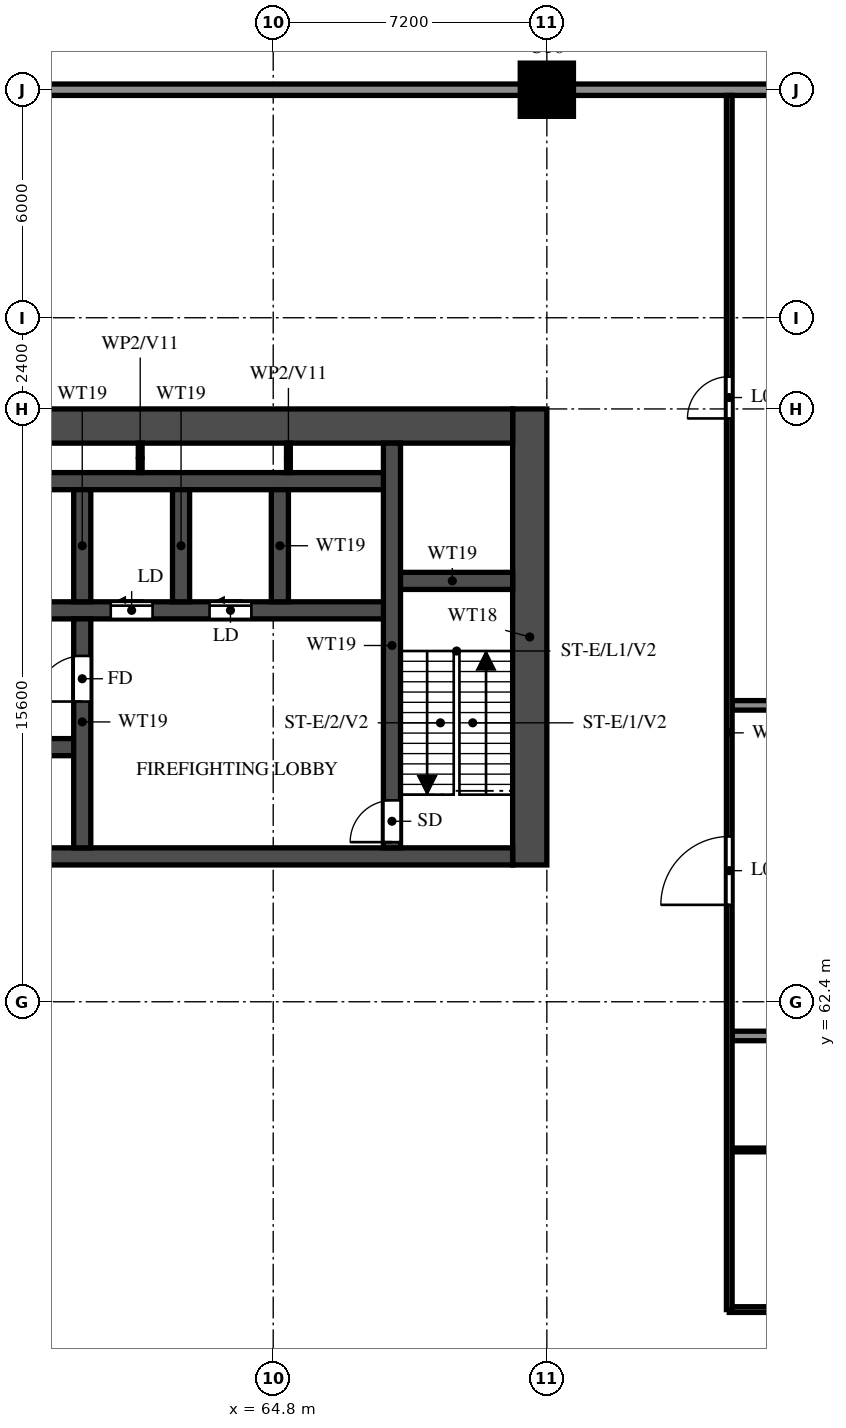
"""IFC4 building model, lengths in metres.
Left out: names, types, materials, properties, quantities, classifications, styles, units other than length and angle.
Written with IfcOpenShell. Run it as: python <this file> out.ifc"""

import sys

from ifc_helpers import new_model, si_unit, direction, frame, frame_2d, origin, origin_2d, place, context, subcontext, project, spatial, rectangle, circle, extrude, source, transform, mapped, element, fill, save


model = new_model("IFC4")
c1 = context("Model", 3, precision=1e-05, world=origin(), true_north=direction((0.0, 1.0)))
c2 = subcontext(c1, "Body", "Model", "MODEL_VIEW")
j1 = project(units=[si_unit("LENGTHUNIT", "METRE"), si_unit("PLANEANGLEUNIT", "RADIAN")], contexts=[c1])
p1 = place(None, origin())
s1 = spatial("IfcSite", under=j1, at=p1, CompositionType="ELEMENT")
p2 = place(p1, origin())
s2 = spatial("IfcBuilding", under=s1, at=p2, CompositionType="ELEMENT")
p3 = place(p2, frame((0.0, 0.0, 21.6)))
s3 = spatial("IfcBuildingStorey", under=s2, at=p3, CompositionType="ELEMENT", Elevation=21.6)
m1 = source(origin(), c2, "Body", "SweptSolid", [
    extrude(circle(Radius=0.7, at=origin_2d()), origin(), (0.0, 0.0, 1.0), 4.95),
])
p4 = place(p3, frame((72.0, 86.4, 0.0), z_axis=(0.0, 0.0, 1.0), x_axis=(1.0, 0.0, 0.0)))
e1 = element("IfcColumn", 1, at=p4, inside=s3, PredefinedType="COLUMN", context=c2, shape_type="MappedRepresentation", body=[
    mapped(m1, transform((0.0, 0.0, 0.0))),
])
p5 = place(p3, frame((71.55, 66.0, 0.0), z_axis=(0.0, 0.0, 1.0), x_axis=(0.0, 1.0, 0.0)))
e2 = element("IfcWall", 2, at=p5, inside=s3, PredefinedType="SHEAR", context=c2, shape_type="SweptSolid", body=[
    extrude(rectangle(XDim=12.0, YDim=0.9, at=frame_2d((6.0, 0.0))), origin(), (0.0, 0.0, 1.0), 4.95),
])
p6 = place(p3, frame((29.7, 77.55, 0.0), z_axis=(0.0, 0.0, 1.0), x_axis=(1.0, 0.0, 0.0)))
e3 = element("IfcWall", 3, at=p6, inside=s3, PredefinedType="SHEAR", context=c2, shape_type="SweptSolid", body=[
    extrude(rectangle(XDim=41.4, YDim=0.9, at=frame_2d((20.7, 0.0))), origin(), (0.0, 0.0, 1.0), 4.95),
])
p7 = place(p3, frame((29.7, 66.225, 0.0), z_axis=(0.0, 0.0, 1.0), x_axis=(1.0, 0.0, 0.0)))
e4 = element("IfcWall", 4, at=p7, inside=s3, PredefinedType="SHEAR", context=c2, shape_type="SweptSolid", body=[
    extrude(rectangle(XDim=41.4, YDim=0.45, at=frame_2d((20.7, 0.0))), origin(), (0.0, 0.0, 1.0), 4.95),
])
p8 = place(p7, frame((0.925, 0.0, 0.0)))
e5 = element("IfcOpeningElement", 5, at=p8, cuts=e4, PredefinedType="OPENING", context=c2, shape_type="SweptSolid", body=[
    extrude(rectangle(XDim=1.1, YDim=2.1, at=frame_2d((0.55, 1.05))), frame((0.0, 0.235, 0.0), z_axis=(0.0, -1.0, 0.0), x_axis=(1.0, 0.0, 0.0)), (0.0, 0.0, 1.0), 0.47),
])
p9 = place(p7, frame((3.738, 0.0, 0.0)))
e6 = element("IfcOpeningElement", 6, at=p9, cuts=e4, PredefinedType="OPENING", context=c2, shape_type="SweptSolid", body=[
    extrude(rectangle(XDim=1.8, YDim=2.1, at=frame_2d((0.9, 1.05))), frame((0.0, 0.235, 0.0), z_axis=(0.0, -1.0, 0.0), x_axis=(1.0, 0.0, 0.0)), (0.0, 0.0, 1.0), 0.47),
])
p10 = place(p3, frame((35.575, 69.1, 0.0), z_axis=(0.0, 0.0, 1.0), x_axis=(1.0, 0.0, 0.0)))
e7 = element("IfcWall", 7, at=p10, inside=s3, PredefinedType="SHEAR", context=c2, shape_type="SweptSolid", body=[
    extrude(rectangle(XDim=24.2, YDim=0.45, at=frame_2d((12.1, 0.0))), origin(), (0.0, 0.0, 1.0), 4.95),
])
p11 = place(p10, frame((1.05, 0.0, 0.0)))
e8 = element("IfcOpeningElement", 8, at=p11, cuts=e7, PredefinedType="OPENING", context=c2, shape_type="SweptSolid", body=[
    extrude(rectangle(XDim=1.1, YDim=2.1, at=frame_2d((0.55, 1.05))), frame((0.0, 0.235, 0.0), z_axis=(0.0, -1.0, 0.0), x_axis=(1.0, 0.0, 0.0)), (0.0, 0.0, 1.0), 0.47),
])
p12 = place(p10, frame((3.8, 0.0, 0.0)))
e9 = element("IfcOpeningElement", 9, at=p12, cuts=e7, PredefinedType="OPENING", context=c2, shape_type="SweptSolid", body=[
    extrude(rectangle(XDim=1.1, YDim=2.1, at=frame_2d((0.55, 1.05))), frame((0.0, 0.235, 0.0), z_axis=(0.0, -1.0, 0.0), x_axis=(1.0, 0.0, 0.0)), (0.0, 0.0, 1.0), 0.47),
])
p13 = place(p10, frame((6.55, 0.0, 0.0)))
e10 = element("IfcOpeningElement", 10, at=p13, cuts=e7, PredefinedType="OPENING", context=c2, shape_type="SweptSolid", body=[
    extrude(rectangle(XDim=1.1, YDim=2.1, at=frame_2d((0.55, 1.05))), frame((0.0, 0.235, 0.0), z_axis=(0.0, -1.0, 0.0), x_axis=(1.0, 0.0, 0.0)), (0.0, 0.0, 1.0), 0.47),
])
p14 = place(p10, frame((9.3, 0.0, 0.0)))
e11 = element("IfcOpeningElement", 11, at=p14, cuts=e7, PredefinedType="OPENING", context=c2, shape_type="SweptSolid", body=[
    extrude(rectangle(XDim=1.1, YDim=2.1, at=frame_2d((0.55, 1.05))), frame((0.0, 0.235, 0.0), z_axis=(0.0, -1.0, 0.0), x_axis=(1.0, 0.0, 0.0)), (0.0, 0.0, 1.0), 0.47),
])
p15 = place(p10, frame((12.05, 0.0, 0.0)))
e12 = element("IfcOpeningElement", 12, at=p15, cuts=e7, PredefinedType="OPENING", context=c2, shape_type="SweptSolid", body=[
    extrude(rectangle(XDim=1.1, YDim=2.1, at=frame_2d((0.55, 1.05))), frame((0.0, 0.235, 0.0), z_axis=(0.0, -1.0, 0.0), x_axis=(1.0, 0.0, 0.0)), (0.0, 0.0, 1.0), 0.47),
])
p16 = place(p10, frame((14.8, 0.0, 0.0)))
e13 = element("IfcOpeningElement", 13, at=p16, cuts=e7, PredefinedType="OPENING", context=c2, shape_type="SweptSolid", body=[
    extrude(rectangle(XDim=1.1, YDim=2.1, at=frame_2d((0.55, 1.05))), frame((0.0, 0.235, 0.0), z_axis=(0.0, -1.0, 0.0), x_axis=(1.0, 0.0, 0.0)), (0.0, 0.0, 1.0), 0.47),
])
p17 = place(p3, frame((32.875, 72.7, 0.0), z_axis=(0.0, 0.0, 1.0), x_axis=(1.0, 0.0, 0.0)))
e14 = element("IfcWall", 14, at=p17, inside=s3, PredefinedType="SHEAR", context=c2, shape_type="SweptSolid", body=[
    extrude(rectangle(XDim=35.05, YDim=0.45, at=frame_2d((17.525, 0.0))), origin(), (0.0, 0.0, 1.0), 4.95),
])
p18 = place(p17, frame((19.8, 0.0, 0.0)))
e15 = element("IfcOpeningElement", 15, at=p18, cuts=e14, PredefinedType="OPENING", context=c2, shape_type="SweptSolid", body=[
    extrude(rectangle(XDim=1.1, YDim=2.1, at=frame_2d((0.55, 1.05))), frame((0.0, 0.235, 0.0), z_axis=(0.0, -1.0, 0.0), x_axis=(1.0, 0.0, 0.0)), (0.0, 0.0, 1.0), 0.47),
])
p19 = place(p17, frame((27.65, 0.0, 0.0)))
e16 = element("IfcOpeningElement", 16, at=p19, cuts=e14, PredefinedType="OPENING", context=c2, shape_type="SweptSolid", body=[
    extrude(rectangle(XDim=1.1, YDim=2.1, at=frame_2d((0.55, 1.05))), frame((0.0, 0.235, 0.0), z_axis=(0.0, -1.0, 0.0), x_axis=(1.0, 0.0, 0.0)), (0.0, 0.0, 1.0), 0.47),
])
p20 = place(p17, frame((30.25, 0.0, 0.0)))
e17 = element("IfcOpeningElement", 17, at=p20, cuts=e14, PredefinedType="OPENING", context=c2, shape_type="SweptSolid", body=[
    extrude(rectangle(XDim=1.1, YDim=2.1, at=frame_2d((0.55, 1.05))), frame((0.0, 0.235, 0.0), z_axis=(0.0, -1.0, 0.0), x_axis=(1.0, 0.0, 0.0)), (0.0, 0.0, 1.0), 0.47),
])
p21 = place(p17, frame((3.75, 0.0, 0.0)))
e18 = element("IfcOpeningElement", 18, at=p21, cuts=e14, PredefinedType="OPENING", context=c2, shape_type="SweptSolid", body=[
    extrude(rectangle(XDim=1.1, YDim=2.1, at=frame_2d((0.55, 1.05))), frame((0.0, 0.235, 0.0), z_axis=(0.0, -1.0, 0.0), x_axis=(1.0, 0.0, 0.0)), (0.0, 0.0, 1.0), 0.47),
])
p22 = place(p17, frame((6.5, 0.0, 0.0)))
e19 = element("IfcOpeningElement", 19, at=p22, cuts=e14, PredefinedType="OPENING", context=c2, shape_type="SweptSolid", body=[
    extrude(rectangle(XDim=1.1, YDim=2.1, at=frame_2d((0.55, 1.05))), frame((0.0, 0.235, 0.0), z_axis=(0.0, -1.0, 0.0), x_axis=(1.0, 0.0, 0.0)), (0.0, 0.0, 1.0), 0.47),
])
p23 = place(p17, frame((9.25, 0.0, 0.0)))
e20 = element("IfcOpeningElement", 20, at=p23, cuts=e14, PredefinedType="OPENING", context=c2, shape_type="SweptSolid", body=[
    extrude(rectangle(XDim=1.1, YDim=2.1, at=frame_2d((0.55, 1.05))), frame((0.0, 0.235, 0.0), z_axis=(0.0, -1.0, 0.0), x_axis=(1.0, 0.0, 0.0)), (0.0, 0.0, 1.0), 0.47),
])
p24 = place(p17, frame((12.0, 0.0, 0.0)))
e21 = element("IfcOpeningElement", 21, at=p24, cuts=e14, PredefinedType="OPENING", context=c2, shape_type="SweptSolid", body=[
    extrude(rectangle(XDim=1.1, YDim=2.1, at=frame_2d((0.55, 1.05))), frame((0.0, 0.235, 0.0), z_axis=(0.0, -1.0, 0.0), x_axis=(1.0, 0.0, 0.0)), (0.0, 0.0, 1.0), 0.47),
])
p25 = place(p17, frame((14.75, 0.0, 0.0)))
e22 = element("IfcOpeningElement", 22, at=p25, cuts=e14, PredefinedType="OPENING", context=c2, shape_type="SweptSolid", body=[
    extrude(rectangle(XDim=1.1, YDim=2.1, at=frame_2d((0.55, 1.05))), frame((0.0, 0.235, 0.0), z_axis=(0.0, -1.0, 0.0), x_axis=(1.0, 0.0, 0.0)), (0.0, 0.0, 1.0), 0.47),
])
p26 = place(p17, frame((17.5, 0.0, 0.0)))
e23 = element("IfcOpeningElement", 23, at=p26, cuts=e14, PredefinedType="OPENING", context=c2, shape_type="SweptSolid", body=[
    extrude(rectangle(XDim=1.1, YDim=2.1, at=frame_2d((0.55, 1.05))), frame((0.0, 0.235, 0.0), z_axis=(0.0, -1.0, 0.0), x_axis=(1.0, 0.0, 0.0)), (0.0, 0.0, 1.0), 0.47),
])
p27 = place(p17, frame((0.913, 0.0, 0.0)))
e24 = element("IfcOpeningElement", 24, at=p27, cuts=e14, PredefinedType="OPENING", context=c2, shape_type="SweptSolid", body=[
    extrude(rectangle(XDim=1.1, YDim=2.1, at=frame_2d((0.55, 1.05))), frame((0.0, 0.235, 0.0), z_axis=(0.0, -1.0, 0.0), x_axis=(1.0, 0.0, 0.0)), (0.0, 0.0, 1.0), 0.47),
])
p28 = place(p3, frame((32.875, 76.1, 0.0), z_axis=(0.0, 0.0, 1.0), x_axis=(1.0, 0.0, 0.0)))
e25 = element("IfcWall", 25, at=p28, inside=s3, PredefinedType="SHEAR", context=c2, shape_type="SweptSolid", body=[
    extrude(rectangle(XDim=35.05, YDim=0.45, at=frame_2d((17.525, 0.0))), origin(), (0.0, 0.0, 1.0), 4.95),
])
p29 = place(p3, frame((67.925, 73.475, 0.0), z_axis=(0.0, 0.0, 1.0), x_axis=(1.0, 0.0, 0.0)))
e26 = element("IfcWall", 26, at=p29, inside=s3, PredefinedType="SHEAR", context=c2, shape_type="SweptSolid", body=[
    extrude(rectangle(XDim=3.175, YDim=0.45, at=frame_2d((1.587, 0.0))), origin(), (0.0, 0.0, 1.0), 4.95),
])
p30 = place(p3, frame((67.925, 66.45, 0.0), z_axis=(0.0, 0.0, 1.0), x_axis=(0.0, 1.0, 0.0)))
e27 = element("IfcWall", 27, at=p30, inside=s3, PredefinedType="SHEAR", context=c2, shape_type="SweptSolid", body=[
    extrude(rectangle(XDim=10.65, YDim=0.45, at=frame_2d((5.325, 0.0))), origin(), (0.0, 0.0, 1.0), 4.95),
])
p31 = place(p30, frame((0.15, 0.0, 0.0)))
e28 = element("IfcOpeningElement", 28, at=p31, cuts=e27, PredefinedType="OPENING", context=c2, shape_type="SweptSolid", body=[
    extrude(rectangle(XDim=1.1, YDim=2.1, at=frame_2d((0.55, 1.05))), frame((0.0, 0.235, 0.0), z_axis=(0.0, -1.0, 0.0), x_axis=(1.0, 0.0, 0.0)), (0.0, 0.0, 1.0), 0.47),
])
p32 = place(p3, frame((59.775, 66.45, 0.0), z_axis=(0.0, 0.0, 1.0), x_axis=(0.0, 1.0, 0.0)))
e29 = element("IfcWall", 29, at=p32, inside=s3, PredefinedType="SHEAR", context=c2, shape_type="SweptSolid", body=[
    extrude(rectangle(XDim=6.025, YDim=0.45, at=frame_2d((3.013, 0.0))), origin(), (0.0, 0.0, 1.0), 4.95),
])
p33 = place(p32, frame((3.85, 0.0, 0.0)))
e30 = element("IfcOpeningElement", 30, at=p33, cuts=e29, PredefinedType="OPENING", context=c2, shape_type="SweptSolid", body=[
    extrude(rectangle(XDim=1.2, YDim=2.1, at=frame_2d((0.6, 1.05))), frame((0.0, 0.235, 0.0), z_axis=(0.0, -1.0, 0.0), x_axis=(1.0, 0.0, 0.0)), (0.0, 0.0, 1.0), 0.47),
])
for number, where, z_axis, x_axis in (
    (31, (59.775, 72.925, 0.0), (0.0, 0.0, 1.0), (0.0, 1.0, 0.0)),
    (32, (62.375, 72.925, 0.0), (0.0, 0.0, 1.0), (0.0, 1.0, 0.0)),
    (33, (64.975, 72.925, 0.0), (0.0, 0.0, 1.0), (0.0, 1.0, 0.0)),
):
    element("IfcWall", number, at=place(p3, frame(where, z_axis=z_axis, x_axis=x_axis)), inside=s3, PredefinedType="SHEAR", context=c2, shape_type="SweptSolid", body=[
        extrude(rectangle(XDim=2.95, YDim=0.45, at=frame_2d((1.475, 0.0))), origin(), (0.0, 0.0, 1.0), 4.95),
    ])
for number, where, z_axis, x_axis in (
    (34, (61.3, 76.325, 0.0), (0.0, 0.0, 1.0), (0.0, 1.0, 0.0)),
    (35, (65.2, 76.325, 0.0), (0.0, 0.0, 1.0), (0.0, 1.0, 0.0)),
):
    element("IfcWall", number, at=place(p3, frame(where, z_axis=z_axis, x_axis=x_axis)), inside=s3, PredefinedType="PARTITIONING", context=c2, shape_type="SweptSolid", body=[
        extrude(rectangle(XDim=0.775, YDim=0.1, at=frame_2d((0.388, 0.0))), origin(), (0.0, 0.0, 1.0), 4.95),
    ])
p34 = place(p3, frame((76.8, 54.3, 0.0), z_axis=(0.0, 0.0, 1.0), x_axis=(1.0, 0.0, 0.0)))
e36 = element("IfcWall", 36, at=p34, inside=s3, PredefinedType="PARTITIONING", context=c2, shape_type="SweptSolid", body=[
    extrude(rectangle(XDim=19.75, YDim=0.15, at=frame_2d((9.875, 0.0))), origin(), (0.0, 0.0, 1.0), 3.45),
])
p35 = place(p34, frame((6.65, 0.0, 0.0)))
e37 = element("IfcOpeningElement", 37, at=p35, cuts=e36, PredefinedType="OPENING", context=c2, shape_type="SweptSolid", body=[
    extrude(rectangle(XDim=1.1, YDim=2.1, at=frame_2d((0.55, 1.05))), frame((0.0, 0.085, 0.0), z_axis=(0.0, -1.0, 0.0), x_axis=(1.0, 0.0, 0.0)), (0.0, 0.0, 1.0), 0.17),
])
p36 = place(p3, frame((76.875, 58.5, 0.0), z_axis=(0.0, 0.0, 1.0), x_axis=(1.0, 0.0, 0.0)))
e38 = element("IfcWall", 38, at=p36, inside=s3, PredefinedType="PARTITIONING", context=c2, shape_type="SweptSolid", body=[
    extrude(rectangle(XDim=4.675, YDim=0.1, at=frame_2d((2.337, 0.0))), origin(), (0.0, 0.0, 1.0), 3.45),
])
p37 = place(p3, frame((76.875, 61.5, 0.0), z_axis=(0.0, 0.0, 1.0), x_axis=(1.0, 0.0, 0.0)))
e39 = element("IfcWall", 39, at=p37, inside=s3, PredefinedType="SOLIDWALL", context=c2, shape_type="SweptSolid", body=[
    extrude(rectangle(XDim=14.325, YDim=0.25, at=frame_2d((7.163, 0.0))), origin(), (0.0, 0.0, 1.0), 3.45),
])
p38 = place(p3, frame((76.875, 70.2, 0.0), z_axis=(0.0, 0.0, 1.0), x_axis=(1.0, 0.0, 0.0)))
e40 = element("IfcWall", 40, at=p38, inside=s3, PredefinedType="SOLIDWALL", context=c2, shape_type="SweptSolid", body=[
    extrude(rectangle(XDim=23.775, YDim=0.25, at=frame_2d((11.887, 0.0))), origin(), (0.0, 0.0, 1.0), 3.45),
])
p39 = place(p3, frame((0.0, 86.4, 0.0), z_axis=(0.0, 0.0, 1.0), x_axis=(1.0, 0.0, 0.0)))
e41 = element("IfcWall", 41, at=p39, inside=s3, PredefinedType="SOLIDWALL", context=c2, shape_type="SweptSolid", body=[
    extrude(rectangle(XDim=100.8, YDim=0.3, at=frame_2d((50.4, 0.0))), origin(), (0.0, 0.0, 1.0), 4.95),
])
p40 = place(p39, frame((2.4, 0.0, 0.6)))
e42 = element("IfcOpeningElement", 42, at=p40, cuts=e41, PredefinedType="OPENING", context=c2, shape_type="SweptSolid", body=[
    extrude(rectangle(XDim=1.8, YDim=2.4, at=frame_2d((0.9, 1.2))), frame((0.0, 0.16, 0.0), z_axis=(0.0, -1.0, 0.0), x_axis=(1.0, 0.0, 0.0)), (0.0, 0.0, 1.0), 0.32),
])
p41 = place(p39, frame((6.0, 0.0, 0.6)))
e43 = element("IfcOpeningElement", 43, at=p41, cuts=e41, PredefinedType="OPENING", context=c2, shape_type="SweptSolid", body=[
    extrude(rectangle(XDim=1.8, YDim=2.4, at=frame_2d((0.9, 1.2))), frame((0.0, 0.16, 0.0), z_axis=(0.0, -1.0, 0.0), x_axis=(1.0, 0.0, 0.0)), (0.0, 0.0, 1.0), 0.32),
])
p42 = place(p39, frame((9.6, 0.0, 0.6)))
e44 = element("IfcOpeningElement", 44, at=p42, cuts=e41, PredefinedType="OPENING", context=c2, shape_type="SweptSolid", body=[
    extrude(rectangle(XDim=1.8, YDim=2.4, at=frame_2d((0.9, 1.2))), frame((0.0, 0.16, 0.0), z_axis=(0.0, -1.0, 0.0), x_axis=(1.0, 0.0, 0.0)), (0.0, 0.0, 1.0), 0.32),
])
p43 = place(p39, frame((16.8, 0.0, 0.6)))
e45 = element("IfcOpeningElement", 45, at=p43, cuts=e41, PredefinedType="OPENING", context=c2, shape_type="SweptSolid", body=[
    extrude(rectangle(XDim=1.8, YDim=2.4, at=frame_2d((0.9, 1.2))), frame((0.0, 0.16, 0.0), z_axis=(0.0, -1.0, 0.0), x_axis=(1.0, 0.0, 0.0)), (0.0, 0.0, 1.0), 0.32),
])
p44 = place(p39, frame((20.4, 0.0, 0.6)))
e46 = element("IfcOpeningElement", 46, at=p44, cuts=e41, PredefinedType="OPENING", context=c2, shape_type="SweptSolid", body=[
    extrude(rectangle(XDim=1.8, YDim=2.4, at=frame_2d((0.9, 1.2))), frame((0.0, 0.16, 0.0), z_axis=(0.0, -1.0, 0.0), x_axis=(1.0, 0.0, 0.0)), (0.0, 0.0, 1.0), 0.32),
])
p45 = place(p39, frame((78.0, 0.0, 0.6)))
e47 = element("IfcOpeningElement", 47, at=p45, cuts=e41, PredefinedType="OPENING", context=c2, shape_type="SweptSolid", body=[
    extrude(rectangle(XDim=1.8, YDim=2.4, at=frame_2d((0.9, 1.2))), frame((0.0, 0.16, 0.0), z_axis=(0.0, -1.0, 0.0), x_axis=(1.0, 0.0, 0.0)), (0.0, 0.0, 1.0), 0.32),
])
p46 = place(p39, frame((81.6, 0.0, 0.6)))
e48 = element("IfcOpeningElement", 48, at=p46, cuts=e41, PredefinedType="OPENING", context=c2, shape_type="SweptSolid", body=[
    extrude(rectangle(XDim=1.8, YDim=2.4, at=frame_2d((0.9, 1.2))), frame((0.0, 0.16, 0.0), z_axis=(0.0, -1.0, 0.0), x_axis=(1.0, 0.0, 0.0)), (0.0, 0.0, 1.0), 0.32),
])
p47 = place(p39, frame((88.8, 0.0, 0.6)))
e49 = element("IfcOpeningElement", 49, at=p47, cuts=e41, PredefinedType="OPENING", context=c2, shape_type="SweptSolid", body=[
    extrude(rectangle(XDim=1.8, YDim=2.4, at=frame_2d((0.9, 1.2))), frame((0.0, 0.16, 0.0), z_axis=(0.0, -1.0, 0.0), x_axis=(1.0, 0.0, 0.0)), (0.0, 0.0, 1.0), 0.32),
])
p48 = place(p39, frame((92.4, 0.0, 0.6)))
e50 = element("IfcOpeningElement", 50, at=p48, cuts=e41, PredefinedType="OPENING", context=c2, shape_type="SweptSolid", body=[
    extrude(rectangle(XDim=1.8, YDim=2.4, at=frame_2d((0.9, 1.2))), frame((0.0, 0.16, 0.0), z_axis=(0.0, -1.0, 0.0), x_axis=(1.0, 0.0, 0.0)), (0.0, 0.0, 1.0), 0.32),
])
p49 = place(p39, frame((96.0, 0.0, 0.6)))
e51 = element("IfcOpeningElement", 51, at=p49, cuts=e41, PredefinedType="OPENING", context=c2, shape_type="SweptSolid", body=[
    extrude(rectangle(XDim=1.8, YDim=2.4, at=frame_2d((0.9, 1.2))), frame((0.0, 0.16, 0.0), z_axis=(0.0, -1.0, 0.0), x_axis=(1.0, 0.0, 0.0)), (0.0, 0.0, 1.0), 0.32),
])
p50 = place(p3, frame((76.8, 54.3, 0.0), z_axis=(0.0, 0.0, 1.0), x_axis=(0.0, 1.0, 0.0)))
e52 = element("IfcWall", 52, at=p50, inside=s3, PredefinedType="PARTITIONING", context=c2, shape_type="SweptSolid", body=[
    extrude(rectangle(XDim=31.95, YDim=0.15, at=frame_2d((15.975, 0.0))), origin(), (0.0, 0.0, 1.0), 3.75),
])
p51 = place(p50, frame((10.65, 0.0, 0.0)))
e53 = element("IfcOpeningElement", 53, at=p51, cuts=e52, PredefinedType="OPENING", context=c2, shape_type="SweptSolid", body=[
    extrude(rectangle(XDim=1.8, YDim=2.1, at=frame_2d((0.9, 1.05))), frame((0.0, 0.085, 0.0), z_axis=(0.0, -1.0, 0.0), x_axis=(1.0, 0.0, 0.0)), (0.0, 0.0, 1.0), 0.17),
])
p52 = place(p50, frame((23.45, 0.0, 0.0)))
e54 = element("IfcOpeningElement", 54, at=p52, cuts=e52, PredefinedType="OPENING", context=c2, shape_type="SweptSolid", body=[
    extrude(rectangle(XDim=1.1, YDim=2.1, at=frame_2d((0.55, 1.05))), frame((0.0, 0.085, 0.0), z_axis=(0.0, -1.0, 0.0), x_axis=(1.0, 0.0, 0.0)), (0.0, 0.0, 1.0), 0.17),
])
p53 = place(p31, origin())
e55 = element("IfcDoor", 55, at=p53, inside=s3, OperationType="SINGLE_SWING_LEFT", PredefinedType="DOOR", context=c2, shape_type="SweptSolid", body=[
    extrude(rectangle(XDim=1.1, YDim=2.1, at=frame_2d((0.55, 1.05))), frame((0.0, 0.025, 0.0), z_axis=(0.0, -1.0, 0.0), x_axis=(1.0, 0.0, 0.0)), (0.0, 0.0, 1.0), 0.05),
])
fill(e28, e55)
p54 = place(p33, origin())
e56 = element("IfcDoor", 56, at=p54, inside=s3, OperationType="SINGLE_SWING_RIGHT", PredefinedType="DOOR", context=c2, shape_type="SweptSolid", body=[
    extrude(rectangle(XDim=1.2, YDim=2.1, at=frame_2d((0.6, 1.05))), frame((0.0, 0.025, 0.0), z_axis=(0.0, -1.0, 0.0), x_axis=(1.0, 0.0, 0.0)), (0.0, 0.0, 1.0), 0.05),
])
fill(e30, e56)
p55 = place(p19, origin())
e57 = element("IfcDoor", 57, at=p55, inside=s3, OperationType="SLIDING_TO_LEFT", PredefinedType="DOOR", context=c2, shape_type="SweptSolid", body=[
    extrude(rectangle(XDim=1.1, YDim=2.1, at=frame_2d((0.55, 1.05))), frame((0.0, 0.025, 0.0), z_axis=(0.0, -1.0, 0.0), x_axis=(1.0, 0.0, 0.0)), (0.0, 0.0, 1.0), 0.05),
])
fill(e16, e57)
p56 = place(p20, origin())
e58 = element("IfcDoor", 58, at=p56, inside=s3, OperationType="SLIDING_TO_LEFT", PredefinedType="DOOR", context=c2, shape_type="SweptSolid", body=[
    extrude(rectangle(XDim=1.1, YDim=2.1, at=frame_2d((0.55, 1.05))), frame((0.0, 0.025, 0.0), z_axis=(0.0, -1.0, 0.0), x_axis=(1.0, 0.0, 0.0)), (0.0, 0.0, 1.0), 0.05),
])
fill(e17, e58)
p57 = place(p51, origin())
e59 = element("IfcDoor", 59, at=p57, inside=s3, OperationType="DOUBLE_DOOR_SINGLE_SWING", PredefinedType="DOOR", context=c2, shape_type="SweptSolid", body=[
    extrude(rectangle(XDim=1.8, YDim=2.1, at=frame_2d((0.9, 1.05))), frame((0.0, 0.025, 0.0), z_axis=(0.0, -1.0, 0.0), x_axis=(1.0, 0.0, 0.0)), (0.0, 0.0, 1.0), 0.05),
])
fill(e53, e59)
p58 = place(p52, origin())
e60 = element("IfcDoor", 60, at=p58, inside=s3, OperationType="SINGLE_SWING_RIGHT", PredefinedType="DOOR", context=c2, shape_type="SweptSolid", body=[
    extrude(rectangle(XDim=1.1, YDim=2.1, at=frame_2d((0.55, 1.05))), frame((0.0, 0.025, 0.0), z_axis=(0.0, -1.0, 0.0), x_axis=(1.0, 0.0, 0.0)), (0.0, 0.0, 1.0), 0.05),
])
fill(e54, e60)
save(model, sys.argv[1])
